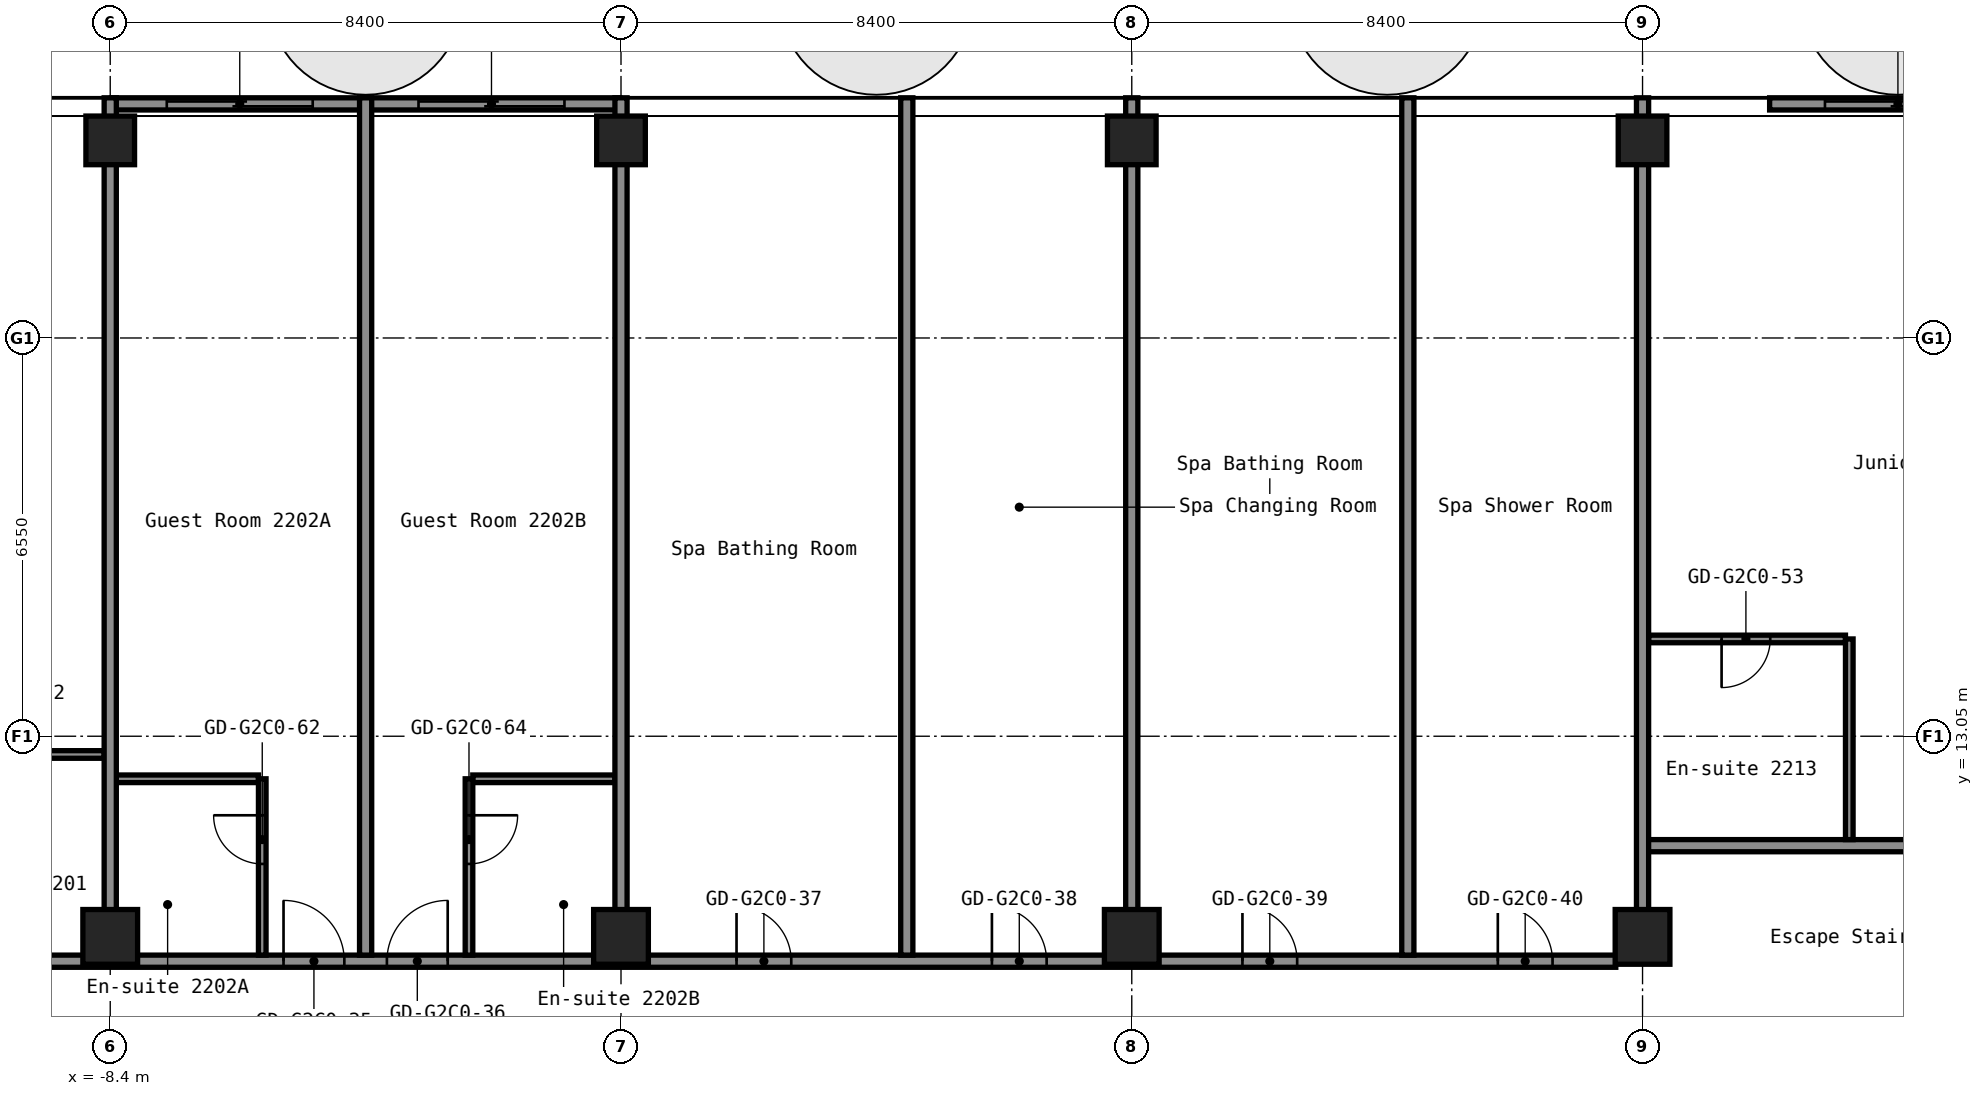
"""IFC4 building model, lengths in metres.
Left out: names, types, materials, properties, quantities, classifications, styles, units other than length and angle.
Written with IfcOpenShell. Run it as: python <this file> out.ifc"""

import sys

from ifc_helpers import new_model, si_unit, direction, frame, frame_2d, origin, origin_2d, place, context, subcontext, project, spatial, rectangle, hollow_rectangle, extrude, element, fill, save


model = new_model("IFC4")
c1 = context("Model", 3, precision=1e-05, world=origin(), true_north=direction((0.0, 1.0)))
c2 = subcontext(c1, "Body", "Model", "MODEL_VIEW")
j1 = project(units=[si_unit("LENGTHUNIT", "METRE"), si_unit("PLANEANGLEUNIT", "RADIAN")], contexts=[c1])
p1 = place(None, origin())
s1 = spatial("IfcSite", under=j1, at=p1, CompositionType="ELEMENT")
p2 = place(p1, origin())
s2 = spatial("IfcBuilding", under=s1, at=p2, CompositionType="ELEMENT")
p3 = place(p2, frame((0.0, 0.0, 81.8)))
s3 = spatial("IfcBuildingStorey", under=s2, at=p3, CompositionType="ELEMENT", Elevation=81.8)
p4 = place(p3, frame((-8.4, 9.75, 0.0), z_axis=(0.0, 0.0, 1.0), x_axis=(1.0, 0.0, 0.0)))
e1 = element("IfcColumn", 1, at=p4, inside=s3, PredefinedType="COLUMN", context=c2, shape_type="SweptSolid", body=[
    extrude(hollow_rectangle(XDim=0.9, YDim=0.9, WallThickness=0.036, at=origin_2d()), origin(), (0.0, 0.0, 1.0), 2.8),
])
p5 = place(p3, frame((-8.4, 22.85, 0.0), z_axis=(0.0, 0.0, 1.0), x_axis=(1.0, 0.0, 0.0)))
e2 = element("IfcColumn", 2, at=p5, inside=s3, PredefinedType="COLUMN", context=c2, shape_type="SweptSolid", body=[
    extrude(hollow_rectangle(XDim=0.8, YDim=0.8, WallThickness=0.032, at=origin_2d()), origin(), (0.0, 0.0, 1.0), 2.8),
])
p6 = place(p3, frame((0.0, 9.75, 0.0), z_axis=(0.0, 0.0, 1.0), x_axis=(1.0, 0.0, 0.0)))
e3 = element("IfcColumn", 3, at=p6, inside=s3, PredefinedType="COLUMN", context=c2, shape_type="SweptSolid", body=[
    extrude(hollow_rectangle(XDim=0.9, YDim=0.9, WallThickness=0.036, at=origin_2d()), origin(), (0.0, 0.0, 1.0), 2.8),
])
p7 = place(p3, frame((0.0, 22.85, 0.0), z_axis=(0.0, 0.0, 1.0), x_axis=(1.0, 0.0, 0.0)))
e4 = element("IfcColumn", 4, at=p7, inside=s3, PredefinedType="COLUMN", context=c2, shape_type="SweptSolid", body=[
    extrude(hollow_rectangle(XDim=0.8, YDim=0.8, WallThickness=0.032, at=origin_2d()), origin(), (0.0, 0.0, 1.0), 2.8),
])
p8 = place(p3, frame((8.4, 9.75, 0.0), z_axis=(0.0, 0.0, 1.0), x_axis=(1.0, 0.0, 0.0)))
e5 = element("IfcColumn", 5, at=p8, inside=s3, PredefinedType="COLUMN", context=c2, shape_type="SweptSolid", body=[
    extrude(hollow_rectangle(XDim=0.9, YDim=0.9, WallThickness=0.036, at=origin_2d()), origin(), (0.0, 0.0, 1.0), 2.8),
])
p9 = place(p3, frame((8.4, 22.85, 0.0), z_axis=(0.0, 0.0, 1.0), x_axis=(1.0, 0.0, 0.0)))
e6 = element("IfcColumn", 6, at=p9, inside=s3, PredefinedType="COLUMN", context=c2, shape_type="SweptSolid", body=[
    extrude(hollow_rectangle(XDim=0.8, YDim=0.8, WallThickness=0.032, at=origin_2d()), origin(), (0.0, 0.0, 1.0), 2.8),
])
p10 = place(p3, frame((16.8, 9.75, 0.0), z_axis=(0.0, 0.0, 1.0), x_axis=(1.0, 0.0, 0.0)))
e7 = element("IfcColumn", 7, at=p10, inside=s3, PredefinedType="COLUMN", context=c2, shape_type="SweptSolid", body=[
    extrude(hollow_rectangle(XDim=0.9, YDim=0.9, WallThickness=0.036, at=origin_2d()), origin(), (0.0, 0.0, 1.0), 2.8),
])
p11 = place(p3, frame((16.8, 22.85, 0.0), z_axis=(0.0, 0.0, 1.0), x_axis=(1.0, 0.0, 0.0)))
e8 = element("IfcColumn", 8, at=p11, inside=s3, PredefinedType="COLUMN", context=c2, shape_type="SweptSolid", body=[
    extrude(hollow_rectangle(XDim=0.8, YDim=0.8, WallThickness=0.032, at=origin_2d()), origin(), (0.0, 0.0, 1.0), 2.8),
])
p12 = place(p3, frame((-16.36, 9.35, 0.0), z_axis=(0.0, 0.0, 1.0), x_axis=(1.0, 0.0, 0.0)))
e9 = element("IfcWall", 9, at=p12, inside=s3, PredefinedType="PARTITIONING", context=c2, shape_type="SweptSolid", body=[
    extrude(rectangle(XDim=32.72, YDim=0.2, at=frame_2d((16.36, 0.0))), origin(), (0.0, 0.0, 1.0), 2.8),
])
p13 = place(p12, frame((1.56, 0.0, 0.0)))
e10 = element("IfcOpeningElement", 10, at=p13, cuts=e9, PredefinedType="OPENING", context=c2, shape_type="SweptSolid", body=[
    extrude(rectangle(XDim=1.0, YDim=2.1, at=frame_2d((0.5, 1.05))), frame((0.0, 0.11, 0.0), z_axis=(0.0, -1.0, 0.0), x_axis=(1.0, 0.0, 0.0)), (0.0, 0.0, 1.0), 0.22),
])
p14 = place(p12, frame((10.81, 0.0, 0.0)))
e11 = element("IfcOpeningElement", 11, at=p14, cuts=e9, PredefinedType="OPENING", context=c2, shape_type="SweptSolid", body=[
    extrude(rectangle(XDim=1.0, YDim=2.1, at=frame_2d((0.5, 1.05))), frame((0.0, 0.11, 0.0), z_axis=(0.0, -1.0, 0.0), x_axis=(1.0, 0.0, 0.0)), (0.0, 0.0, 1.0), 0.22),
])
p15 = place(p12, frame((12.51, 0.0, 0.0)))
e12 = element("IfcOpeningElement", 12, at=p15, cuts=e9, PredefinedType="OPENING", context=c2, shape_type="SweptSolid", body=[
    extrude(rectangle(XDim=1.0, YDim=2.1, at=frame_2d((0.5, 1.05))), frame((0.0, 0.11, 0.0), z_axis=(0.0, -1.0, 0.0), x_axis=(1.0, 0.0, 0.0)), (0.0, 0.0, 1.0), 0.22),
])
p16 = place(p12, frame((18.26, 0.0, 0.0)))
e13 = element("IfcOpeningElement", 13, at=p16, cuts=e9, PredefinedType="OPENING", context=c2, shape_type="SweptSolid", body=[
    extrude(rectangle(XDim=0.9, YDim=2.1, at=frame_2d((0.45, 1.05))), frame((0.0, 0.11, 0.0), z_axis=(0.0, -1.0, 0.0), x_axis=(1.0, 0.0, 0.0)), (0.0, 0.0, 1.0), 0.22),
])
p17 = place(p12, frame((22.46, 0.0, 0.0)))
e14 = element("IfcOpeningElement", 14, at=p17, cuts=e9, PredefinedType="OPENING", context=c2, shape_type="SweptSolid", body=[
    extrude(rectangle(XDim=0.9, YDim=2.1, at=frame_2d((0.45, 1.05))), frame((0.0, 0.11, 0.0), z_axis=(0.0, -1.0, 0.0), x_axis=(1.0, 0.0, 0.0)), (0.0, 0.0, 1.0), 0.22),
])
p18 = place(p12, frame((26.58, 0.0, 0.0)))
e15 = element("IfcOpeningElement", 15, at=p18, cuts=e9, PredefinedType="OPENING", context=c2, shape_type="SweptSolid", body=[
    extrude(rectangle(XDim=0.9, YDim=2.1, at=frame_2d((0.45, 1.05))), frame((0.0, 0.11, 0.0), z_axis=(0.0, -1.0, 0.0), x_axis=(1.0, 0.0, 0.0)), (0.0, 0.0, 1.0), 0.22),
])
p19 = place(p12, frame((30.78, 0.0, 0.0)))
e16 = element("IfcOpeningElement", 16, at=p19, cuts=e9, PredefinedType="OPENING", context=c2, shape_type="SweptSolid", body=[
    extrude(rectangle(XDim=0.9, YDim=2.1, at=frame_2d((0.45, 1.05))), frame((0.0, 0.11, 0.0), z_axis=(0.0, -1.0, 0.0), x_axis=(1.0, 0.0, 0.0)), (0.0, 0.0, 1.0), 0.22),
])
p20 = place(p3, frame((16.8, 11.25, 0.0), z_axis=(0.0, 0.0, 1.0), x_axis=(1.0, 0.0, 0.0)))
e17 = element("IfcWall", 17, at=p20, inside=s3, PredefinedType="PARTITIONING", context=c2, shape_type="SweptSolid", body=[
    extrude(rectangle(XDim=29.7, YDim=0.2, at=frame_2d((14.85, 0.0))), origin(), (0.0, 0.0, 1.0), 2.8),
])
p21 = place(p20, frame((5.4, 0.0, 0.0)))
e18 = element("IfcOpeningElement", 18, at=p21, cuts=e17, PredefinedType="OPENING", context=c2, shape_type="SweptSolid", body=[
    extrude(rectangle(XDim=1.0, YDim=2.1, at=frame_2d((0.5, 1.05))), frame((0.0, 0.11, 0.0), z_axis=(0.0, -1.0, 0.0), x_axis=(1.0, 0.0, 0.0)), (0.0, 0.0, 1.0), 0.22),
])
p22 = place(p20, frame((11.25, 0.0, 0.0)))
e19 = element("IfcOpeningElement", 19, at=p22, cuts=e17, PredefinedType="OPENING", context=c2, shape_type="SweptSolid", body=[
    extrude(rectangle(XDim=1.0, YDim=2.1, at=frame_2d((0.5, 1.05))), frame((0.0, 0.11, 0.0), z_axis=(0.0, -1.0, 0.0), x_axis=(1.0, 0.0, 0.0)), (0.0, 0.0, 1.0), 0.22),
])
p23 = place(p20, frame((12.95, 0.0, 0.0)))
e20 = element("IfcOpeningElement", 20, at=p23, cuts=e17, PredefinedType="OPENING", context=c2, shape_type="SweptSolid", body=[
    extrude(rectangle(XDim=1.0, YDim=2.1, at=frame_2d((0.5, 1.05))), frame((0.0, 0.11, 0.0), z_axis=(0.0, -1.0, 0.0), x_axis=(1.0, 0.0, 0.0)), (0.0, 0.0, 1.0), 0.22),
])
p24 = place(p20, frame((18.8, 0.0, 0.0)))
e21 = element("IfcOpeningElement", 21, at=p24, cuts=e17, PredefinedType="OPENING", context=c2, shape_type="SweptSolid", body=[
    extrude(rectangle(XDim=1.0, YDim=2.1, at=frame_2d((0.5, 1.05))), frame((0.0, 0.11, 0.0), z_axis=(0.0, -1.0, 0.0), x_axis=(1.0, 0.0, 0.0)), (0.0, 0.0, 1.0), 0.22),
])
p25 = place(p20, frame((26.85, 0.0, 0.0)))
e22 = element("IfcOpeningElement", 22, at=p25, cuts=e17, PredefinedType="OPENING", context=c2, shape_type="SweptSolid", body=[
    extrude(rectangle(XDim=0.9, YDim=2.1, at=frame_2d((0.45, 1.05))), frame((0.0, 0.11, 0.0), z_axis=(0.0, -1.0, 0.0), x_axis=(1.0, 0.0, 0.0)), (0.0, 0.0, 1.0), 0.22),
])
p26 = place(p3, frame((-8.3, 12.35, 0.0), z_axis=(0.0, 0.0, 1.0), x_axis=(1.0, 0.0, 0.0)))
e23 = element("IfcWall", 23, at=p26, inside=s3, PredefinedType="PARTITIONING", context=c2, shape_type="SweptSolid", body=[
    extrude(rectangle(XDim=2.338, YDim=0.125, at=frame_2d((1.169, 0.0))), origin(), (0.0, 0.0, 1.0), 2.8),
])
p27 = place(p3, frame((-2.438, 12.35, 0.0), z_axis=(0.0, 0.0, 1.0), x_axis=(1.0, 0.0, 0.0)))
e24 = element("IfcWall", 24, at=p27, inside=s3, PredefinedType="PARTITIONING", context=c2, shape_type="SweptSolid", body=[
    extrude(rectangle(XDim=2.337, YDim=0.125, at=frame_2d((1.169, 0.0))), origin(), (0.0, 0.0, 1.0), 2.8),
])
p28 = place(p3, frame((-11.738, 12.75, 0.0), z_axis=(0.0, 0.0, 1.0), x_axis=(1.0, 0.0, 0.0)))
e25 = element("IfcWall", 25, at=p28, inside=s3, PredefinedType="PARTITIONING", context=c2, shape_type="SweptSolid", body=[
    extrude(rectangle(XDim=3.238, YDim=0.125, at=frame_2d((1.619, 0.0))), origin(), (0.0, 0.0, 1.0), 2.8),
])
p29 = place(p28, frame((1.238, 0.0, 0.0)))
e26 = element("IfcOpeningElement", 26, at=p29, cuts=e25, PredefinedType="OPENING", context=c2, shape_type="SweptSolid", body=[
    extrude(rectangle(XDim=0.8, YDim=2.1, at=frame_2d((0.4, 1.05))), frame((0.0, 0.073, 0.0), z_axis=(0.0, -1.0, 0.0), x_axis=(1.0, 0.0, 0.0)), (0.0, 0.0, 1.0), 0.145),
])
p30 = place(p3, frame((16.9, 14.65, 0.0), z_axis=(0.0, 0.0, 1.0), x_axis=(1.0, 0.0, 0.0)))
e27 = element("IfcWall", 27, at=p30, inside=s3, PredefinedType="PARTITIONING", context=c2, shape_type="SweptSolid", body=[
    extrude(rectangle(XDim=3.238, YDim=0.125, at=frame_2d((1.619, 0.0))), origin(), (0.0, 0.0, 1.0), 2.8),
])
p31 = place(p30, frame((1.2, 0.0, 0.0)))
e28 = element("IfcOpeningElement", 28, at=p31, cuts=e27, PredefinedType="OPENING", context=c2, shape_type="SweptSolid", body=[
    extrude(rectangle(XDim=0.8, YDim=2.1, at=frame_2d((0.4, 1.05))), frame((0.0, 0.073, 0.0), z_axis=(0.0, -1.0, 0.0), x_axis=(1.0, 0.0, 0.0)), (0.0, 0.0, 1.0), 0.145),
])
p32 = place(p3, frame((-8.4, 10.19, 0.0), z_axis=(0.0, 0.0, 1.0), x_axis=(0.0, 1.0, 0.0)))
e29 = element("IfcWall", 29, at=p32, inside=s3, PredefinedType="PARTITIONING", context=c2, shape_type="SweptSolid", body=[
    extrude(rectangle(XDim=13.36, YDim=0.2, at=frame_2d((6.68, 0.0))), origin(), (0.0, 0.0, 1.0), 2.8),
])
p33 = place(p3, frame((-5.9, 9.45, 0.0), z_axis=(0.0, 0.0, 1.0), x_axis=(0.0, 1.0, 0.0)))
e30 = element("IfcWall", 30, at=p33, inside=s3, PredefinedType="PARTITIONING", context=c2, shape_type="SweptSolid", body=[
    extrude(rectangle(XDim=2.9, YDim=0.125, at=frame_2d((1.45, 0.0))), origin(), (0.0, 0.0, 1.0), 2.8),
])
p34 = place(p33, frame((1.5, 0.0, 0.0)))
e31 = element("IfcOpeningElement", 31, at=p34, cuts=e30, PredefinedType="OPENING", context=c2, shape_type="SweptSolid", body=[
    extrude(rectangle(XDim=0.8, YDim=2.1, at=frame_2d((0.4, 1.05))), frame((0.0, 0.073, 0.0), z_axis=(0.0, -1.0, 0.0), x_axis=(1.0, 0.0, 0.0)), (0.0, 0.0, 1.0), 0.145),
])
p35 = place(p3, frame((-4.2, 9.45, 0.0), z_axis=(0.0, 0.0, 1.0), x_axis=(0.0, 1.0, 0.0)))
e32 = element("IfcWall", 32, at=p35, inside=s3, PredefinedType="PARTITIONING", context=c2, shape_type="SweptSolid", body=[
    extrude(rectangle(XDim=14.1, YDim=0.2, at=frame_2d((7.05, 0.0))), origin(), (0.0, 0.0, 1.0), 2.8),
])
p36 = place(p3, frame((-2.5, 9.45, 0.0), z_axis=(0.0, 0.0, 1.0), x_axis=(0.0, 1.0, 0.0)))
e33 = element("IfcWall", 33, at=p36, inside=s3, PredefinedType="PARTITIONING", context=c2, shape_type="SweptSolid", body=[
    extrude(rectangle(XDim=2.9, YDim=0.125, at=frame_2d((1.45, 0.0))), origin(), (0.0, 0.0, 1.0), 2.8),
])
p37 = place(p36, frame((1.5, 0.0, 0.0)))
e34 = element("IfcOpeningElement", 34, at=p37, cuts=e33, PredefinedType="OPENING", context=c2, shape_type="SweptSolid", body=[
    extrude(rectangle(XDim=0.8, YDim=2.1, at=frame_2d((0.4, 1.05))), frame((0.0, 0.073, 0.0), z_axis=(0.0, -1.0, 0.0), x_axis=(1.0, 0.0, 0.0)), (0.0, 0.0, 1.0), 0.145),
])
p38 = place(p3, frame((0.0, 10.19, 0.0), z_axis=(0.0, 0.0, 1.0), x_axis=(0.0, 1.0, 0.0)))
e35 = element("IfcWall", 35, at=p38, inside=s3, PredefinedType="PARTITIONING", context=c2, shape_type="SweptSolid", body=[
    extrude(rectangle(XDim=13.36, YDim=0.2, at=frame_2d((6.68, 0.0))), origin(), (0.0, 0.0, 1.0), 2.8),
])
p39 = place(p3, frame((4.7, 9.45, 0.0), z_axis=(0.0, 0.0, 1.0), x_axis=(0.0, 1.0, 0.0)))
e36 = element("IfcWall", 36, at=p39, inside=s3, PredefinedType="PARTITIONING", context=c2, shape_type="SweptSolid", body=[
    extrude(rectangle(XDim=14.1, YDim=0.2, at=frame_2d((7.05, 0.0))), origin(), (0.0, 0.0, 1.0), 2.8),
])
p40 = place(p3, frame((8.4, 10.19, 0.0), z_axis=(0.0, 0.0, 1.0), x_axis=(0.0, 1.0, 0.0)))
e37 = element("IfcWall", 37, at=p40, inside=s3, PredefinedType="PARTITIONING", context=c2, shape_type="SweptSolid", body=[
    extrude(rectangle(XDim=13.36, YDim=0.2, at=frame_2d((6.68, 0.0))), origin(), (0.0, 0.0, 1.0), 2.8),
])
p41 = place(p3, frame((12.94, 9.45, 0.0), z_axis=(0.0, 0.0, 1.0), x_axis=(0.0, 1.0, 0.0)))
e38 = element("IfcWall", 38, at=p41, inside=s3, PredefinedType="PARTITIONING", context=c2, shape_type="SweptSolid", body=[
    extrude(rectangle(XDim=14.1, YDim=0.2, at=frame_2d((7.05, 0.0))), origin(), (0.0, 0.0, 1.0), 2.8),
])
p42 = place(p3, frame((16.8, 10.19, 0.0), z_axis=(0.0, 0.0, 1.0), x_axis=(0.0, 1.0, 0.0)))
e39 = element("IfcWall", 39, at=p42, inside=s3, PredefinedType="PARTITIONING", context=c2, shape_type="SweptSolid", body=[
    extrude(rectangle(XDim=13.36, YDim=0.2, at=frame_2d((6.68, 0.0))), origin(), (0.0, 0.0, 1.0), 2.8),
])
p43 = place(p3, frame((20.2, 11.35, 0.0), z_axis=(0.0, 0.0, 1.0), x_axis=(0.0, 1.0, 0.0)))
e40 = element("IfcWall", 40, at=p43, inside=s3, PredefinedType="PARTITIONING", context=c2, shape_type="SweptSolid", body=[
    extrude(rectangle(XDim=3.3, YDim=0.125, at=frame_2d((1.65, 0.0))), origin(), (0.0, 0.0, 1.0), 2.8),
])
p44 = place(p3, frame((23.11, 23.45, 0.0), z_axis=(0.0, 0.0, 1.0), x_axis=(-1.0, 0.0, 0.0)))
p45 = place(p44, frame((0.91, 0.0, 0.0)))
p46 = place(p45, frame((2.4, 0.0, 0.0), z_axis=(0.0, 0.0, 1.0), x_axis=(-1.0, 0.0, 0.0)))
e41 = element("IfcDoor", 41, at=p46, inside=s3, OperationType="SLIDING_TO_LEFT", PredefinedType="DOOR", context=c2, shape_type="SweptSolid", body=[
    extrude(rectangle(XDim=2.4, YDim=2.2, at=frame_2d((1.2, 1.1))), frame((0.0, 0.025, 0.0), z_axis=(0.0, -1.0, 0.0), x_axis=(1.0, 0.0, 0.0)), (0.0, 0.0, 1.0), 0.05),
])
p47 = place(p3, frame((-0.02, 23.45, 0.0), z_axis=(0.0, 0.0, 1.0), x_axis=(-1.0, 0.0, 0.0)))
p48 = place(p47, frame((0.91, 0.0, 0.0)))
p49 = place(p48, frame((2.4, 0.0, 0.0), z_axis=(0.0, 0.0, 1.0), x_axis=(-1.0, 0.0, 0.0)))
e42 = element("IfcDoor", 42, at=p49, inside=s3, OperationType="SLIDING_TO_LEFT", PredefinedType="DOOR", context=c2, shape_type="SweptSolid", body=[
    extrude(rectangle(XDim=2.4, YDim=2.2, at=frame_2d((1.2, 1.1))), frame((0.0, 0.025, 0.0), z_axis=(0.0, -1.0, 0.0), x_axis=(1.0, 0.0, 0.0)), (0.0, 0.0, 1.0), 0.05),
])
p50 = place(p3, frame((-4.16, 23.45, 0.0), z_axis=(0.0, 0.0, 1.0), x_axis=(-1.0, 0.0, 0.0)))
p51 = place(p50, frame((0.91, 0.0, 0.0)))
p52 = place(p51, frame((2.4, 0.0, 0.0), z_axis=(0.0, 0.0, 1.0), x_axis=(-1.0, 0.0, 0.0)))
e43 = element("IfcDoor", 43, at=p52, inside=s3, OperationType="SLIDING_TO_LEFT", PredefinedType="DOOR", context=c2, shape_type="SweptSolid", body=[
    extrude(rectangle(XDim=2.4, YDim=2.2, at=frame_2d((1.2, 1.1))), frame((0.0, 0.025, 0.0), z_axis=(0.0, -1.0, 0.0), x_axis=(1.0, 0.0, 0.0)), (0.0, 0.0, 1.0), 0.05),
])
p53 = place(p14, origin())
e44 = element("IfcDoor", 44, at=p53, inside=s3, OperationType="SINGLE_SWING_RIGHT", PredefinedType="DOOR", context=c2, shape_type="SweptSolid", body=[
    extrude(rectangle(XDim=1.0, YDim=2.1, at=frame_2d((0.5, 1.05))), frame((0.0, 0.025, 0.0), z_axis=(0.0, -1.0, 0.0), x_axis=(1.0, 0.0, 0.0)), (0.0, 0.0, 1.0), 0.05),
])
fill(e11, e44)
p54 = place(p15, origin())
e45 = element("IfcDoor", 45, at=p54, inside=s3, OperationType="SINGLE_SWING_LEFT", PredefinedType="DOOR", context=c2, shape_type="SweptSolid", body=[
    extrude(rectangle(XDim=1.0, YDim=2.1, at=frame_2d((0.5, 1.05))), frame((0.0, 0.025, 0.0), z_axis=(0.0, -1.0, 0.0), x_axis=(1.0, 0.0, 0.0)), (0.0, 0.0, 1.0), 0.05),
])
fill(e12, e45)
p55 = place(p16, origin())
e46 = element("IfcDoor", 46, at=p55, inside=s3, OperationType="SINGLE_SWING_RIGHT", PredefinedType="DOOR", context=c2, shape_type="SweptSolid", body=[
    extrude(rectangle(XDim=0.9, YDim=2.1, at=frame_2d((0.45, 1.05))), frame((0.0, 0.025, 0.0), z_axis=(0.0, -1.0, 0.0), x_axis=(1.0, 0.0, 0.0)), (0.0, 0.0, 1.0), 0.05),
])
fill(e13, e46)
p56 = place(p17, origin())
e47 = element("IfcDoor", 47, at=p56, inside=s3, OperationType="SINGLE_SWING_RIGHT", PredefinedType="DOOR", context=c2, shape_type="SweptSolid", body=[
    extrude(rectangle(XDim=0.9, YDim=2.1, at=frame_2d((0.45, 1.05))), frame((0.0, 0.025, 0.0), z_axis=(0.0, -1.0, 0.0), x_axis=(1.0, 0.0, 0.0)), (0.0, 0.0, 1.0), 0.05),
])
fill(e14, e47)
p57 = place(p18, origin())
e48 = element("IfcDoor", 48, at=p57, inside=s3, OperationType="SINGLE_SWING_RIGHT", PredefinedType="DOOR", context=c2, shape_type="SweptSolid", body=[
    extrude(rectangle(XDim=0.9, YDim=2.1, at=frame_2d((0.45, 1.05))), frame((0.0, 0.025, 0.0), z_axis=(0.0, -1.0, 0.0), x_axis=(1.0, 0.0, 0.0)), (0.0, 0.0, 1.0), 0.05),
])
fill(e15, e48)
p58 = place(p19, origin())
e49 = element("IfcDoor", 49, at=p58, inside=s3, OperationType="SINGLE_SWING_RIGHT", PredefinedType="DOOR", context=c2, shape_type="SweptSolid", body=[
    extrude(rectangle(XDim=0.9, YDim=2.1, at=frame_2d((0.45, 1.05))), frame((0.0, 0.025, 0.0), z_axis=(0.0, -1.0, 0.0), x_axis=(1.0, 0.0, 0.0)), (0.0, 0.0, 1.0), 0.05),
])
fill(e16, e49)
p59 = place(p31, origin())
e50 = element("IfcDoor", 50, at=p59, inside=s3, OperationType="SINGLE_SWING_LEFT", PredefinedType="DOOR", context=c2, shape_type="SweptSolid", body=[
    extrude(rectangle(XDim=0.8, YDim=2.1, at=frame_2d((0.4, 1.05))), frame((0.0, 0.025, 0.0), z_axis=(0.0, -1.0, 0.0), x_axis=(1.0, 0.0, 0.0)), (0.0, 0.0, 1.0), 0.05),
])
fill(e28, e50)
p60 = place(p34, origin())
e51 = element("IfcDoor", 51, at=p60, inside=s3, OperationType="SINGLE_SWING_LEFT", PredefinedType="DOOR", context=c2, shape_type="SweptSolid", body=[
    extrude(rectangle(XDim=0.8, YDim=2.1, at=frame_2d((0.4, 1.05))), frame((0.0, 0.025, 0.0), z_axis=(0.0, -1.0, 0.0), x_axis=(1.0, 0.0, 0.0)), (0.0, 0.0, 1.0), 0.05),
])
fill(e31, e51)
p61 = place(p37, origin())
e52 = element("IfcDoor", 52, at=p61, inside=s3, OperationType="SINGLE_SWING_RIGHT", PredefinedType="DOOR", context=c2, shape_type="SweptSolid", body=[
    extrude(rectangle(XDim=0.8, YDim=2.1, at=frame_2d((0.4, 1.05))), frame((0.0, 0.025, 0.0), z_axis=(0.0, -1.0, 0.0), x_axis=(1.0, 0.0, 0.0)), (0.0, 0.0, 1.0), 0.05),
])
fill(e34, e52)
save(model, sys.argv[1])
